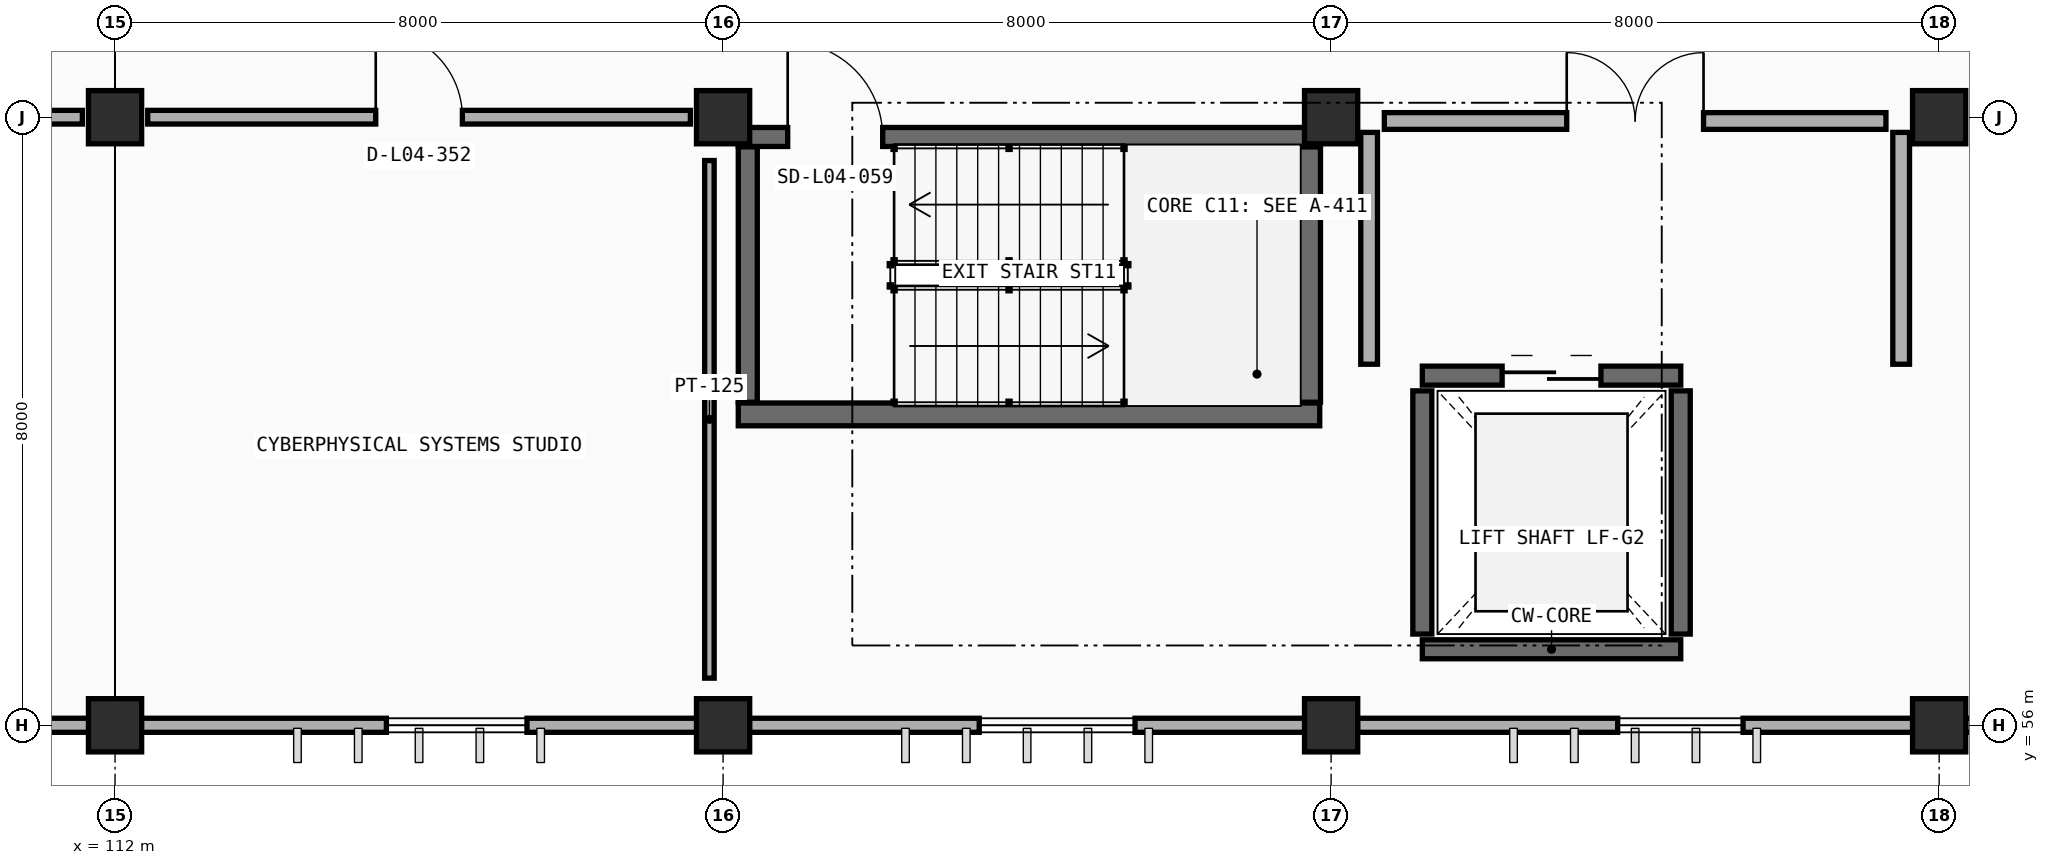
"""IFC4 building model, lengths in metres.
Left out: names, types, materials, properties, quantities, classifications, styles, units other than length and angle.
Written with IfcOpenShell. Run it as: python <this file> out.ifc"""

import sys

from ifc_helpers import new_model, si_unit, direction, frame, frame_2d, origin, origin_2d, place, context, subcontext, project, spatial, rectangle, extrude, element, fill, save


model = new_model("IFC4")
c1 = context("Model", 3, precision=1e-05, world=origin(), true_north=direction((0.0, 1.0)))
c2 = subcontext(c1, "Body", "Model", "MODEL_VIEW")
j1 = project(units=[si_unit("LENGTHUNIT", "METRE"), si_unit("PLANEANGLEUNIT", "RADIAN")], contexts=[c1])
p1 = place(None, origin())
s1 = spatial("IfcSite", under=j1, at=p1, CompositionType="ELEMENT")
p2 = place(p1, origin())
s2 = spatial("IfcBuilding", under=s1, at=p2, CompositionType="ELEMENT")
p3 = place(p2, frame((0.0, 0.0, 13.8)))
s3 = spatial("IfcBuildingStorey", under=s2, at=p3, CompositionType="ELEMENT", Elevation=13.8)
for number, where, z_axis, x_axis in (
    (1, (112.0, 56.0, 0.0), (0.0, 0.0, 1.0), (1.0, 0.0, 0.0)),
    (2, (120.0, 56.0, 0.0), (0.0, 0.0, 1.0), (1.0, 0.0, 0.0)),
    (3, (128.0, 56.0, 0.0), (0.0, 0.0, 1.0), (1.0, 0.0, 0.0)),
    (4, (136.0, 56.0, 0.0), (0.0, 0.0, 1.0), (1.0, 0.0, 0.0)),
    (5, (112.0, 64.0, 0.0), (0.0, 0.0, 1.0), (1.0, 0.0, 0.0)),
    (6, (120.0, 64.0, 0.0), (0.0, 0.0, 1.0), (1.0, 0.0, 0.0)),
    (7, (128.0, 64.0, 0.0), (0.0, 0.0, 1.0), (1.0, 0.0, 0.0)),
    (8, (136.0, 64.0, 0.0), (0.0, 0.0, 1.0), (1.0, 0.0, 0.0)),
):
    element("IfcColumn", number, at=place(p3, frame(where, z_axis=z_axis, x_axis=x_axis)), inside=s3, PredefinedType="COLUMN", context=c2, shape_type="SweptSolid", body=[
        extrude(rectangle(XDim=0.7, YDim=0.7, at=origin_2d()), origin(), (0.0, 0.0, 1.0), 4.2),
    ])
p4 = place(p3, frame((111.653, 56.0, 0.0), z_axis=(0.0, 0.0, 1.0), x_axis=(-1.0, 0.0, 0.0)))
e9 = element("IfcWall", 9, at=p4, inside=s3, PredefinedType="STANDARD", context=c2, shape_type="SweptSolid", body=[
    extrude(rectangle(XDim=7.306, YDim=0.185, at=frame_2d((3.653, 0.0))), origin(), (0.0, 0.0, 1.0), 3.325),
])
p5 = place(p4, frame((2.233, 0.0, 0.9)))
e10 = element("IfcOpeningElement", 10, at=p5, cuts=e9, PredefinedType="OPENING", context=c2, shape_type="SweptSolid", body=[
    extrude(rectangle(XDim=1.65, YDim=2.0, at=frame_2d((0.825, 1.0))), frame((0.0, 0.103, 0.0), z_axis=(0.0, -1.0, 0.0), x_axis=(1.0, 0.0, 0.0)), (0.0, 0.0, 1.0), 0.205),
])
p6 = place(p3, frame((119.653, 56.0, 0.0), z_axis=(0.0, 0.0, 1.0), x_axis=(-1.0, 0.0, 0.0)))
e11 = element("IfcWall", 11, at=p6, inside=s3, PredefinedType="STANDARD", context=c2, shape_type="SweptSolid", body=[
    extrude(rectangle(XDim=7.306, YDim=0.185, at=frame_2d((3.653, 0.0))), origin(), (0.0, 0.0, 1.0), 3.325),
])
p7 = place(p6, frame((2.233, 0.0, 0.9)))
e12 = element("IfcOpeningElement", 12, at=p7, cuts=e11, PredefinedType="OPENING", context=c2, shape_type="SweptSolid", body=[
    extrude(rectangle(XDim=1.85, YDim=2.0, at=frame_2d((0.925, 1.0))), frame((0.0, 0.103, 0.0), z_axis=(0.0, -1.0, 0.0), x_axis=(1.0, 0.0, 0.0)), (0.0, 0.0, 1.0), 0.205),
])
p8 = place(p3, frame((127.653, 56.0, 0.0), z_axis=(0.0, 0.0, 1.0), x_axis=(-1.0, 0.0, 0.0)))
e13 = element("IfcWall", 13, at=p8, inside=s3, PredefinedType="STANDARD", context=c2, shape_type="SweptSolid", body=[
    extrude(rectangle(XDim=7.306, YDim=0.185, at=frame_2d((3.653, 0.0))), origin(), (0.0, 0.0, 1.0), 3.325),
])
p9 = place(p8, frame((2.233, 0.0, 0.9)))
e14 = element("IfcOpeningElement", 14, at=p9, cuts=e13, PredefinedType="OPENING", context=c2, shape_type="SweptSolid", body=[
    extrude(rectangle(XDim=2.05, YDim=2.0, at=frame_2d((1.025, 1.0))), frame((0.0, 0.103, 0.0), z_axis=(0.0, -1.0, 0.0), x_axis=(1.0, 0.0, 0.0)), (0.0, 0.0, 1.0), 0.205),
])
p10 = place(p3, frame((135.653, 56.0, 0.0), z_axis=(0.0, 0.0, 1.0), x_axis=(-1.0, 0.0, 0.0)))
e15 = element("IfcWall", 15, at=p10, inside=s3, PredefinedType="STANDARD", context=c2, shape_type="SweptSolid", body=[
    extrude(rectangle(XDim=7.306, YDim=0.185, at=frame_2d((3.653, 0.0))), origin(), (0.0, 0.0, 1.0), 3.325),
])
p11 = place(p10, frame((2.233, 0.0, 0.9)))
e16 = element("IfcOpeningElement", 16, at=p11, cuts=e15, PredefinedType="OPENING", context=c2, shape_type="SweptSolid", body=[
    extrude(rectangle(XDim=1.65, YDim=2.0, at=frame_2d((0.825, 1.0))), frame((0.0, 0.103, 0.0), z_axis=(0.0, -1.0, 0.0), x_axis=(1.0, 0.0, 0.0)), (0.0, 0.0, 1.0), 0.205),
])
p12 = place(p3, frame((143.653, 56.0, 0.0), z_axis=(0.0, 0.0, 1.0), x_axis=(-1.0, 0.0, 0.0)))
e17 = element("IfcWall", 17, at=p12, inside=s3, PredefinedType="STANDARD", context=c2, shape_type="SweptSolid", body=[
    extrude(rectangle(XDim=7.306, YDim=0.185, at=frame_2d((3.653, 0.0))), origin(), (0.0, 0.0, 1.0), 3.325),
])
p13 = place(p12, frame((2.233, 0.0, 0.9)))
e18 = element("IfcOpeningElement", 18, at=p13, cuts=e17, PredefinedType="OPENING", context=c2, shape_type="SweptSolid", body=[
    extrude(rectangle(XDim=1.85, YDim=2.0, at=frame_2d((0.925, 1.0))), frame((0.0, 0.103, 0.0), z_axis=(0.0, -1.0, 0.0), x_axis=(1.0, 0.0, 0.0)), (0.0, 0.0, 1.0), 0.205),
])
p14 = place(p3, frame((120.2, 60.09, 0.0), z_axis=(0.0, 0.0, 1.0), x_axis=(1.0, 0.0, 0.0)))
e19 = element("IfcWall", 19, at=p14, inside=s3, PredefinedType="SHEAR", context=c2, shape_type="SweptSolid", body=[
    extrude(rectangle(XDim=7.65, YDim=0.3, at=frame_2d((3.825, 0.0))), origin(), (0.0, 0.0, 1.0), 4.2),
])
p15 = place(p3, frame((127.71, 60.25, 0.0), z_axis=(0.0, 0.0, 1.0), x_axis=(0.0, 1.0, 0.0)))
e20 = element("IfcWall", 20, at=p15, inside=s3, PredefinedType="SHEAR", context=c2, shape_type="SweptSolid", body=[
    extrude(rectangle(XDim=3.36, YDim=0.3, at=frame_2d((1.68, 0.0))), origin(), (0.0, 0.0, 1.0), 4.2),
])
p16 = place(p3, frame((120.2, 63.74, 0.0), z_axis=(0.0, 0.0, 1.0), x_axis=(1.0, 0.0, 0.0)))
e21 = element("IfcWall", 21, at=p16, inside=s3, PredefinedType="SOLIDWALL", context=c2, shape_type="SweptSolid", body=[
    extrude(rectangle(XDim=7.65, YDim=0.25, at=frame_2d((3.825, 0.0))), origin(), (0.0, 0.0, 1.0), 4.2),
])
p17 = place(p16, frame((0.65, 0.0, 0.0)))
e22 = element("IfcOpeningElement", 22, at=p17, cuts=e21, PredefinedType="OPENING", context=c2, shape_type="SweptSolid", body=[
    extrude(rectangle(XDim=1.25, YDim=2.15, at=frame_2d((0.625, 1.075))), frame((0.0, 0.135, 0.0), z_axis=(0.0, -1.0, 0.0), x_axis=(1.0, 0.0, 0.0)), (0.0, 0.0, 1.0), 0.27),
])
p18 = place(p3, frame((120.325, 60.25, 0.0), z_axis=(0.0, 0.0, 1.0), x_axis=(0.0, 1.0, 0.0)))
e23 = element("IfcWall", 23, at=p18, inside=s3, PredefinedType="SOLIDWALL", context=c2, shape_type="SweptSolid", body=[
    extrude(rectangle(XDim=3.36, YDim=0.25, at=frame_2d((1.68, 0.0))), origin(), (0.0, 0.0, 1.0), 4.2),
])
p19 = place(p3, frame((129.2, 57.0, 0.0), z_axis=(0.0, 0.0, 1.0), x_axis=(1.0, 0.0, 0.0)))
e24 = element("IfcWall", 24, at=p19, inside=s3, PredefinedType="SOLIDWALL", context=c2, shape_type="SweptSolid", body=[
    extrude(rectangle(XDim=3.4, YDim=0.25, at=frame_2d((1.7, 0.0))), origin(), (0.0, 0.0, 1.0), 4.2),
])
p20 = place(p3, frame((129.2, 60.6, 0.0), z_axis=(0.0, 0.0, 1.0), x_axis=(1.0, 0.0, 0.0)))
e25 = element("IfcWall", 25, at=p20, inside=s3, PredefinedType="SOLIDWALL", context=c2, shape_type="SweptSolid", body=[
    extrude(rectangle(XDim=3.4, YDim=0.25, at=frame_2d((1.7, 0.0))), origin(), (0.0, 0.0, 1.0), 4.2),
])
p21 = place(p20, frame((1.05, 0.0, 0.0)))
e26 = element("IfcOpeningElement", 26, at=p21, cuts=e25, PredefinedType="OPENING", context=c2, shape_type="SweptSolid", body=[
    extrude(rectangle(XDim=1.3, YDim=2.2, at=frame_2d((0.65, 1.1))), frame((0.0, 0.135, 0.0), z_axis=(0.0, -1.0, 0.0), x_axis=(1.0, 0.0, 0.0)), (0.0, 0.0, 1.0), 0.27),
])
for number, where, z_axis, x_axis in (
    (27, (129.2, 57.2, 0.0), (0.0, 0.0, 1.0), (0.0, 1.0, 0.0)),
    (28, (132.6, 57.2, 0.0), (0.0, 0.0, 1.0), (0.0, 1.0, 0.0)),
):
    element("IfcWall", number, at=place(p3, frame(where, z_axis=z_axis, x_axis=x_axis)), inside=s3, PredefinedType="SOLIDWALL", context=c2, shape_type="SweptSolid", body=[
        extrude(rectangle(XDim=3.2, YDim=0.25, at=frame_2d((1.6, 0.0))), origin(), (0.0, 0.0, 1.0), 4.2),
    ])
p22 = place(p3, frame((128.7, 63.95, 0.0), z_axis=(0.0, 0.0, 1.0), x_axis=(1.0, 0.0, 0.0)))
e29 = element("IfcWall", 29, at=p22, inside=s3, PredefinedType="PARTITIONING", context=c2, shape_type="SweptSolid", body=[
    extrude(rectangle(XDim=6.6, YDim=0.22, at=frame_2d((3.3, 0.0))), origin(), (0.0, 0.0, 1.0), 3.275),
])
p23 = place(p22, frame((2.4, 0.0, 0.0)))
e30 = element("IfcOpeningElement", 30, at=p23, cuts=e29, PredefinedType="OPENING", context=c2, shape_type="SweptSolid", body=[
    extrude(rectangle(XDim=1.8, YDim=2.2, at=frame_2d((0.9, 1.1))), frame((0.0, 0.12, 0.0), z_axis=(0.0, -1.0, 0.0), x_axis=(1.0, 0.0, 0.0)), (0.0, 0.0, 1.0), 0.24),
])
for number, where, z_axis, x_axis in (
    (31, (128.5, 60.75, 0.0), (0.0, 0.0, 1.0), (0.0, 1.0, 0.0)),
    (32, (135.5, 60.75, 0.0), (0.0, 0.0, 1.0), (0.0, 1.0, 0.0)),
):
    element("IfcWall", number, at=place(p3, frame(where, z_axis=z_axis, x_axis=x_axis)), inside=s3, PredefinedType="PARTITIONING", context=c2, shape_type="SweptSolid", body=[
        extrude(rectangle(XDim=3.05, YDim=0.22, at=frame_2d((1.525, 0.0))), origin(), (0.0, 0.0, 1.0), 3.225),
    ])
p24 = place(p3, frame((96.43, 64.0, 0.0), z_axis=(0.0, 0.0, 1.0), x_axis=(1.0, 0.0, 0.0)))
e33 = element("IfcWall", 33, at=p24, inside=s3, PredefinedType="PARTITIONING", context=c2, shape_type="SweptSolid", body=[
    extrude(rectangle(XDim=15.14, YDim=0.18, at=frame_2d((7.57, 0.0))), origin(), (0.0, 0.0, 1.0), 3.275),
])
p25 = place(p24, frame((3.03, 0.0, 0.0)))
e34 = element("IfcOpeningElement", 34, at=p25, cuts=e33, PredefinedType="OPENING", context=c2, shape_type="SweptSolid", body=[
    extrude(rectangle(XDim=1.08, YDim=2.15, at=frame_2d((0.54, 1.075))), frame((0.0, 0.1, 0.0), z_axis=(0.0, -1.0, 0.0), x_axis=(1.0, 0.0, 0.0)), (0.0, 0.0, 1.0), 0.2),
])
p26 = place(p3, frame((112.43, 64.0, 0.0), z_axis=(0.0, 0.0, 1.0), x_axis=(1.0, 0.0, 0.0)))
e35 = element("IfcWall", 35, at=p26, inside=s3, PredefinedType="PARTITIONING", context=c2, shape_type="SweptSolid", body=[
    extrude(rectangle(XDim=7.14, YDim=0.18, at=frame_2d((3.57, 0.0))), origin(), (0.0, 0.0, 1.0), 3.275),
])
p27 = place(p26, frame((3.0, 0.0, 0.0)))
e36 = element("IfcOpeningElement", 36, at=p27, cuts=e35, PredefinedType="OPENING", context=c2, shape_type="SweptSolid", body=[
    extrude(rectangle(XDim=1.14, YDim=2.15, at=frame_2d((0.57, 1.075))), frame((0.0, 0.1, 0.0), z_axis=(0.0, -1.0, 0.0), x_axis=(1.0, 0.0, 0.0)), (0.0, 0.0, 1.0), 0.2),
])
p28 = place(p3, frame((119.82, 56.62, 0.0), z_axis=(0.0, 0.0, 1.0), x_axis=(0.0, 1.0, 0.0)))
e37 = element("IfcWall", 37, at=p28, inside=s3, PredefinedType="PARTITIONING", context=c2, shape_type="SweptSolid", body=[
    extrude(rectangle(XDim=6.81, YDim=0.125, at=frame_2d((3.405, 0.0))), origin(), (0.0, 0.0, 1.0), 3.225),
])
p29 = place(p7, origin())
e38 = element("IfcWindow", 38, at=p29, inside=s3, PartitioningType="DOUBLE_PANEL_VERTICAL", PredefinedType="WINDOW", context=c2, shape_type="SweptSolid", body=[
    extrude(rectangle(XDim=1.85, YDim=2.0, at=frame_2d((0.925, 1.0))), frame((0.0, 0.03, 0.0), z_axis=(0.0, -1.0, 0.0), x_axis=(1.0, 0.0, 0.0)), (0.0, 0.0, 1.0), 0.06),
])
fill(e12, e38)
p30 = place(p9, origin())
e39 = element("IfcWindow", 39, at=p30, inside=s3, PartitioningType="DOUBLE_PANEL_VERTICAL", PredefinedType="WINDOW", context=c2, shape_type="SweptSolid", body=[
    extrude(rectangle(XDim=2.05, YDim=2.0, at=frame_2d((1.025, 1.0))), frame((0.0, 0.03, 0.0), z_axis=(0.0, -1.0, 0.0), x_axis=(1.0, 0.0, 0.0)), (0.0, 0.0, 1.0), 0.06),
])
fill(e14, e39)
p31 = place(p11, origin())
e40 = element("IfcWindow", 40, at=p31, inside=s3, PartitioningType="DOUBLE_PANEL_VERTICAL", PredefinedType="WINDOW", context=c2, shape_type="SweptSolid", body=[
    extrude(rectangle(XDim=1.65, YDim=2.0, at=frame_2d((0.825, 1.0))), frame((0.0, 0.03, 0.0), z_axis=(0.0, -1.0, 0.0), x_axis=(1.0, 0.0, 0.0)), (0.0, 0.0, 1.0), 0.06),
])
fill(e16, e40)
p32 = place(p17, origin())
e41 = element("IfcDoor", 41, at=p32, inside=s3, OperationType="SINGLE_SWING_LEFT", PredefinedType="DOOR", context=c2, shape_type="SweptSolid", body=[
    extrude(rectangle(XDim=1.25, YDim=2.15, at=frame_2d((0.625, 1.075))), frame((0.0, 0.025, 0.0), z_axis=(0.0, -1.0, 0.0), x_axis=(1.0, 0.0, 0.0)), (0.0, 0.0, 1.0), 0.05),
])
fill(e22, e41)
p33 = place(p21, origin())
e42 = element("IfcDoor", 42, at=p33, inside=s3, OperationType="DOUBLE_DOOR_SLIDING", PredefinedType="DOOR", context=c2, shape_type="SweptSolid", body=[
    extrude(rectangle(XDim=1.3, YDim=2.2, at=frame_2d((0.65, 1.1))), frame((0.0, 0.025, 0.0), z_axis=(0.0, -1.0, 0.0), x_axis=(1.0, 0.0, 0.0)), (0.0, 0.0, 1.0), 0.05),
])
fill(e26, e42)
p34 = place(p23, origin())
e43 = element("IfcDoor", 43, at=p34, inside=s3, OperationType="DOUBLE_DOOR_SINGLE_SWING", PredefinedType="DOOR", context=c2, shape_type="SweptSolid", body=[
    extrude(rectangle(XDim=1.8, YDim=2.2, at=frame_2d((0.9, 1.1))), frame((0.0, 0.025, 0.0), z_axis=(0.0, -1.0, 0.0), x_axis=(1.0, 0.0, 0.0)), (0.0, 0.0, 1.0), 0.05),
])
fill(e30, e43)
p35 = place(p27, origin())
e44 = element("IfcDoor", 44, at=p35, inside=s3, OperationType="SINGLE_SWING_LEFT", PredefinedType="DOOR", context=c2, shape_type="SweptSolid", body=[
    extrude(rectangle(XDim=1.14, YDim=2.15, at=frame_2d((0.57, 1.075))), frame((0.0, 0.025, 0.0), z_axis=(0.0, -1.0, 0.0), x_axis=(1.0, 0.0, 0.0)), (0.0, 0.0, 1.0), 0.05),
])
fill(e36, e44)
save(model, sys.argv[1])
